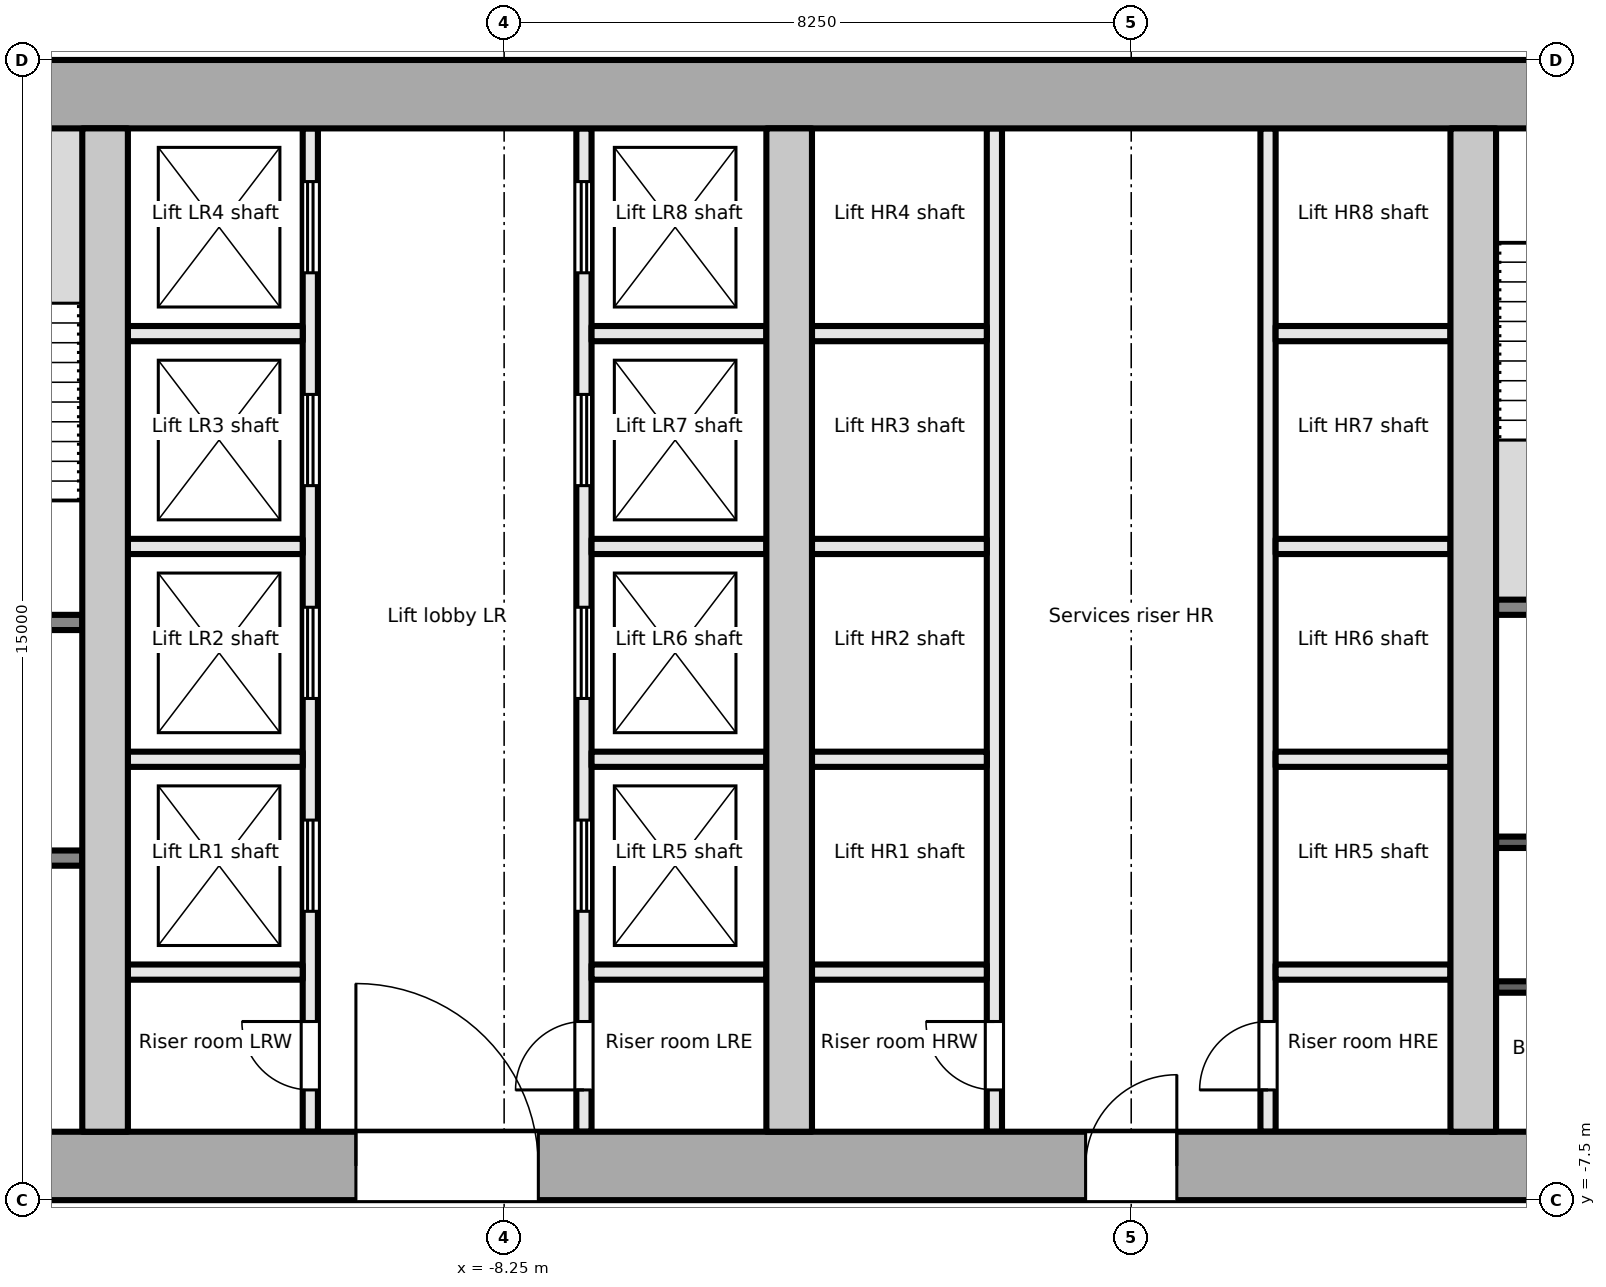
"""IFC4 building model, lengths in metres.
Left out: names, types, materials, properties, quantities, classifications, styles, units other than length and angle.
Written with IfcOpenShell. Run it as: python <this file> out.ifc"""

import sys

from ifc_helpers import new_model, si_unit, direction, frame, frame_2d, origin, place, context, subcontext, project, spatial, rectangle, extrude, element, fill, save


model = new_model("IFC4")
c1 = context("Model", 3, precision=1e-05, world=origin(), true_north=direction((0.0, 1.0)))
c2 = subcontext(c1, "Body", "Model", "MODEL_VIEW")
j1 = project(units=[si_unit("LENGTHUNIT", "METRE"), si_unit("PLANEANGLEUNIT", "RADIAN")], contexts=[c1])
p1 = place(None, origin())
s1 = spatial("IfcSite", under=j1, at=p1, CompositionType="ELEMENT")
p2 = place(p1, origin())
s2 = spatial("IfcBuilding", under=s1, at=p2, CompositionType="ELEMENT")
p3 = place(p2, frame((0.0, 0.0, 79.7)))
s3 = spatial("IfcBuildingStorey", under=s2, at=p3, CompositionType="ELEMENT", Elevation=79.7)
p4 = place(p3, frame((-18.0, -7.05, -0.2), z_axis=(0.0, 0.0, 1.0), x_axis=(1.0, 0.0, 0.0)))
e1 = element("IfcWall", 1, at=p4, inside=s3, PredefinedType="SHEAR", context=c2, shape_type="SweptSolid", body=[
    extrude(rectangle(XDim=36.0, YDim=0.9, at=frame_2d((18.0, 0.0))), origin(), (0.0, 0.0, 1.0), 4.0),
])
p5 = place(p4, frame((7.8, 0.0, 0.2)))
e2 = element("IfcOpeningElement", 2, at=p5, cuts=e1, PredefinedType="OPENING", context=c2, shape_type="SweptSolid", body=[
    extrude(rectangle(XDim=2.4, YDim=2.1, at=frame_2d((1.2, 1.05))), frame((0.0, 0.46, 0.0), z_axis=(0.0, -1.0, 0.0), x_axis=(1.0, 0.0, 0.0)), (0.0, 0.0, 1.0), 0.921),
])
p6 = place(p4, frame((17.4, 0.0, 0.2)))
e3 = element("IfcOpeningElement", 3, at=p6, cuts=e1, PredefinedType="OPENING", context=c2, shape_type="SweptSolid", body=[
    extrude(rectangle(XDim=1.2, YDim=2.1, at=frame_2d((0.6, 1.05))), frame((0.0, 0.46, 0.0), z_axis=(0.0, -1.0, 0.0), x_axis=(1.0, 0.0, 0.0)), (0.0, 0.0, 1.0), 0.921),
])
p7 = place(p4, frame((26.1, 0.0, 0.2)))
e4 = element("IfcOpeningElement", 4, at=p7, cuts=e1, PredefinedType="OPENING", context=c2, shape_type="SweptSolid", body=[
    extrude(rectangle(XDim=2.4, YDim=2.1, at=frame_2d((1.2, 1.05))), frame((0.0, 0.46, 0.0), z_axis=(0.0, -1.0, 0.0), x_axis=(1.0, 0.0, 0.0)), (0.0, 0.0, 1.0), 0.921),
])
p8 = place(p3, frame((-18.0, 7.05, -0.2), z_axis=(0.0, 0.0, 1.0), x_axis=(1.0, 0.0, 0.0)))
e5 = element("IfcWall", 5, at=p8, inside=s3, PredefinedType="SHEAR", context=c2, shape_type="SweptSolid", body=[
    extrude(rectangle(XDim=36.0, YDim=0.9, at=frame_2d((18.0, 0.0))), origin(), (0.0, 0.0, 1.0), 4.0),
])
for number, where, z_axis, x_axis in (
    (6, (-13.5, -6.6, -0.2), (0.0, 0.0, 1.0), (0.0, 1.0, 0.0)),
    (7, (-4.5, -6.6, -0.2), (0.0, 0.0, 1.0), (0.0, 1.0, 0.0)),
    (8, (4.5, -6.6, -0.2), (0.0, 0.0, 1.0), (0.0, 1.0, 0.0)),
):
    element("IfcWall", number, at=place(p3, frame(where, z_axis=z_axis, x_axis=x_axis)), inside=s3, PredefinedType="SHEAR", context=c2, shape_type="SweptSolid", body=[
        extrude(rectangle(XDim=13.2, YDim=0.6, at=frame_2d((6.6, 0.0))), origin(), (0.0, 0.0, 1.0), 4.0),
    ])
p9 = place(p3, frame((-17.1, -3.0, 0.0), z_axis=(0.0, 0.0, 1.0), x_axis=(1.0, 0.0, 0.0)))
e9 = element("IfcWall", 9, at=p9, inside=s3, PredefinedType="PARTITIONING", context=c2, shape_type="SweptSolid", body=[
    extrude(rectangle(XDim=3.3, YDim=0.2, at=frame_2d((1.65, 0.0))), origin(), (0.0, 0.0, 1.0), 3.8),
])
p10 = place(p9, frame((1.1, 0.0, 0.0)))
e10 = element("IfcOpeningElement", 10, at=p10, cuts=e9, PredefinedType="OPENING", context=c2, shape_type="SweptSolid", body=[
    extrude(rectangle(XDim=1.1, YDim=2.1, at=frame_2d((0.55, 1.05))), frame((0.0, 0.111, 0.0), z_axis=(0.0, -1.0, 0.0), x_axis=(1.0, 0.0, 0.0)), (0.0, 0.0, 1.0), 0.221),
])
p11 = place(p3, frame((-17.1, 0.1, 0.0), z_axis=(0.0, 0.0, 1.0), x_axis=(1.0, 0.0, 0.0)))
e11 = element("IfcWall", 11, at=p11, inside=s3, PredefinedType="PARTITIONING", context=c2, shape_type="SweptSolid", body=[
    extrude(rectangle(XDim=3.3, YDim=0.2, at=frame_2d((1.65, 0.0))), origin(), (0.0, 0.0, 1.0), 3.8),
])
p12 = place(p11, frame((1.1, 0.0, 0.0)))
e12 = element("IfcOpeningElement", 12, at=p12, cuts=e11, PredefinedType="OPENING", context=c2, shape_type="SweptSolid", body=[
    extrude(rectangle(XDim=1.1, YDim=2.1, at=frame_2d((0.55, 1.05))), frame((0.0, 0.111, 0.0), z_axis=(0.0, -1.0, 0.0), x_axis=(1.0, 0.0, 0.0)), (0.0, 0.0, 1.0), 0.221),
])
p13 = place(p3, frame((-10.8, -6.6, 0.0), z_axis=(0.0, 0.0, 1.0), x_axis=(0.0, 1.0, 0.0)))
e13 = element("IfcWall", 13, at=p13, inside=s3, PredefinedType="PARTITIONING", context=c2, shape_type="SweptSolid", body=[
    extrude(rectangle(XDim=13.2, YDim=0.2, at=frame_2d((6.6, 0.0))), origin(), (0.0, 0.0, 1.0), 3.8),
])
p14 = place(p13, frame((0.55, 0.0, 0.0)))
e14 = element("IfcOpeningElement", 14, at=p14, cuts=e13, PredefinedType="OPENING", context=c2, shape_type="SweptSolid", body=[
    extrude(rectangle(XDim=0.9, YDim=2.1, at=frame_2d((0.45, 1.05))), frame((0.0, 0.111, 0.0), z_axis=(0.0, -1.0, 0.0), x_axis=(1.0, 0.0, 0.0)), (0.0, 0.0, 1.0), 0.221),
])
p15 = place(p13, frame((2.9, 0.0, 0.0)))
e15 = element("IfcOpeningElement", 15, at=p15, cuts=e13, PredefinedType="OPENING", context=c2, shape_type="SweptSolid", body=[
    extrude(rectangle(XDim=1.2, YDim=2.1, at=frame_2d((0.6, 1.05))), frame((0.0, 0.111, 0.0), z_axis=(0.0, -1.0, 0.0), x_axis=(1.0, 0.0, 0.0)), (0.0, 0.0, 1.0), 0.221),
])
p16 = place(p13, frame((5.7, 0.0, 0.0)))
e16 = element("IfcOpeningElement", 16, at=p16, cuts=e13, PredefinedType="OPENING", context=c2, shape_type="SweptSolid", body=[
    extrude(rectangle(XDim=1.2, YDim=2.1, at=frame_2d((0.6, 1.05))), frame((0.0, 0.111, 0.0), z_axis=(0.0, -1.0, 0.0), x_axis=(1.0, 0.0, 0.0)), (0.0, 0.0, 1.0), 0.221),
])
p17 = place(p13, frame((8.5, 0.0, 0.0)))
e17 = element("IfcOpeningElement", 17, at=p17, cuts=e13, PredefinedType="OPENING", context=c2, shape_type="SweptSolid", body=[
    extrude(rectangle(XDim=1.2, YDim=2.1, at=frame_2d((0.6, 1.05))), frame((0.0, 0.111, 0.0), z_axis=(0.0, -1.0, 0.0), x_axis=(1.0, 0.0, 0.0)), (0.0, 0.0, 1.0), 0.221),
])
p18 = place(p13, frame((11.3, 0.0, 0.0)))
e18 = element("IfcOpeningElement", 18, at=p18, cuts=e13, PredefinedType="OPENING", context=c2, shape_type="SweptSolid", body=[
    extrude(rectangle(XDim=1.2, YDim=2.1, at=frame_2d((0.6, 1.05))), frame((0.0, 0.111, 0.0), z_axis=(0.0, -1.0, 0.0), x_axis=(1.0, 0.0, 0.0)), (0.0, 0.0, 1.0), 0.221),
])
p19 = place(p3, frame((-7.2, -6.6, 0.0), z_axis=(0.0, 0.0, 1.0), x_axis=(0.0, 1.0, 0.0)))
e19 = element("IfcWall", 19, at=p19, inside=s3, PredefinedType="PARTITIONING", context=c2, shape_type="SweptSolid", body=[
    extrude(rectangle(XDim=13.2, YDim=0.2, at=frame_2d((6.6, 0.0))), origin(), (0.0, 0.0, 1.0), 3.8),
])
p20 = place(p19, frame((0.55, 0.0, 0.0)))
e20 = element("IfcOpeningElement", 20, at=p20, cuts=e19, PredefinedType="OPENING", context=c2, shape_type="SweptSolid", body=[
    extrude(rectangle(XDim=0.9, YDim=2.1, at=frame_2d((0.45, 1.05))), frame((0.0, 0.111, 0.0), z_axis=(0.0, -1.0, 0.0), x_axis=(1.0, 0.0, 0.0)), (0.0, 0.0, 1.0), 0.221),
])
p21 = place(p19, frame((2.9, 0.0, 0.0)))
e21 = element("IfcOpeningElement", 21, at=p21, cuts=e19, PredefinedType="OPENING", context=c2, shape_type="SweptSolid", body=[
    extrude(rectangle(XDim=1.2, YDim=2.1, at=frame_2d((0.6, 1.05))), frame((0.0, 0.111, 0.0), z_axis=(0.0, -1.0, 0.0), x_axis=(1.0, 0.0, 0.0)), (0.0, 0.0, 1.0), 0.221),
])
p22 = place(p19, frame((5.7, 0.0, 0.0)))
e22 = element("IfcOpeningElement", 22, at=p22, cuts=e19, PredefinedType="OPENING", context=c2, shape_type="SweptSolid", body=[
    extrude(rectangle(XDim=1.2, YDim=2.1, at=frame_2d((0.6, 1.05))), frame((0.0, 0.111, 0.0), z_axis=(0.0, -1.0, 0.0), x_axis=(1.0, 0.0, 0.0)), (0.0, 0.0, 1.0), 0.221),
])
p23 = place(p19, frame((8.5, 0.0, 0.0)))
e23 = element("IfcOpeningElement", 23, at=p23, cuts=e19, PredefinedType="OPENING", context=c2, shape_type="SweptSolid", body=[
    extrude(rectangle(XDim=1.2, YDim=2.1, at=frame_2d((0.6, 1.05))), frame((0.0, 0.111, 0.0), z_axis=(0.0, -1.0, 0.0), x_axis=(1.0, 0.0, 0.0)), (0.0, 0.0, 1.0), 0.221),
])
p24 = place(p19, frame((11.3, 0.0, 0.0)))
e24 = element("IfcOpeningElement", 24, at=p24, cuts=e19, PredefinedType="OPENING", context=c2, shape_type="SweptSolid", body=[
    extrude(rectangle(XDim=1.2, YDim=2.1, at=frame_2d((0.6, 1.05))), frame((0.0, 0.111, 0.0), z_axis=(0.0, -1.0, 0.0), x_axis=(1.0, 0.0, 0.0)), (0.0, 0.0, 1.0), 0.221),
])
for number, where, z_axis, x_axis in (
    (25, (-13.2, -1.7, 0.0), (0.0, 0.0, 1.0), (1.0, 0.0, 0.0)),
    (26, (-13.2, 1.1, 0.0), (0.0, 0.0, 1.0), (1.0, 0.0, 0.0)),
    (27, (-13.2, 3.9, 0.0), (0.0, 0.0, 1.0), (1.0, 0.0, 0.0)),
    (28, (-13.2, -4.5, 0.0), (0.0, 0.0, 1.0), (1.0, 0.0, 0.0)),
    (29, (-7.1, -1.7, 0.0), (0.0, 0.0, 1.0), (1.0, 0.0, 0.0)),
    (30, (-7.1, 1.1, 0.0), (0.0, 0.0, 1.0), (1.0, 0.0, 0.0)),
    (31, (-7.1, 3.9, 0.0), (0.0, 0.0, 1.0), (1.0, 0.0, 0.0)),
    (32, (-7.1, -4.5, 0.0), (0.0, 0.0, 1.0), (1.0, 0.0, 0.0)),
):
    element("IfcWall", number, at=place(p3, frame(where, z_axis=z_axis, x_axis=x_axis)), inside=s3, PredefinedType="PARTITIONING", context=c2, shape_type="SweptSolid", body=[
        extrude(rectangle(XDim=2.3, YDim=0.2, at=frame_2d((1.15, 0.0))), origin(), (0.0, 0.0, 1.0), 3.8),
    ])
p25 = place(p3, frame((-1.8, -6.6, 0.0), z_axis=(0.0, 0.0, 1.0), x_axis=(0.0, 1.0, 0.0)))
e33 = element("IfcWall", 33, at=p25, inside=s3, PredefinedType="PARTITIONING", context=c2, shape_type="SweptSolid", body=[
    extrude(rectangle(XDim=13.2, YDim=0.2, at=frame_2d((6.6, 0.0))), origin(), (0.0, 0.0, 1.0), 3.8),
])
p26 = place(p25, frame((0.55, 0.0, 0.0)))
e34 = element("IfcOpeningElement", 34, at=p26, cuts=e33, PredefinedType="OPENING", context=c2, shape_type="SweptSolid", body=[
    extrude(rectangle(XDim=0.9, YDim=2.1, at=frame_2d((0.45, 1.05))), frame((0.0, 0.111, 0.0), z_axis=(0.0, -1.0, 0.0), x_axis=(1.0, 0.0, 0.0)), (0.0, 0.0, 1.0), 0.221),
])
p27 = place(p3, frame((1.8, -6.6, 0.0), z_axis=(0.0, 0.0, 1.0), x_axis=(0.0, 1.0, 0.0)))
e35 = element("IfcWall", 35, at=p27, inside=s3, PredefinedType="PARTITIONING", context=c2, shape_type="SweptSolid", body=[
    extrude(rectangle(XDim=13.2, YDim=0.2, at=frame_2d((6.6, 0.0))), origin(), (0.0, 0.0, 1.0), 3.8),
])
p28 = place(p27, frame((0.55, 0.0, 0.0)))
e36 = element("IfcOpeningElement", 36, at=p28, cuts=e35, PredefinedType="OPENING", context=c2, shape_type="SweptSolid", body=[
    extrude(rectangle(XDim=0.9, YDim=2.1, at=frame_2d((0.45, 1.05))), frame((0.0, 0.111, 0.0), z_axis=(0.0, -1.0, 0.0), x_axis=(1.0, 0.0, 0.0)), (0.0, 0.0, 1.0), 0.221),
])
for number, where, z_axis, x_axis in (
    (37, (-4.2, -1.7, 0.0), (0.0, 0.0, 1.0), (1.0, 0.0, 0.0)),
    (38, (-4.2, 1.1, 0.0), (0.0, 0.0, 1.0), (1.0, 0.0, 0.0)),
    (39, (-4.2, 3.9, 0.0), (0.0, 0.0, 1.0), (1.0, 0.0, 0.0)),
    (40, (-4.2, -4.5, 0.0), (0.0, 0.0, 1.0), (1.0, 0.0, 0.0)),
    (41, (1.9, -1.7, 0.0), (0.0, 0.0, 1.0), (1.0, 0.0, 0.0)),
    (42, (1.9, 1.1, 0.0), (0.0, 0.0, 1.0), (1.0, 0.0, 0.0)),
    (43, (1.9, 3.9, 0.0), (0.0, 0.0, 1.0), (1.0, 0.0, 0.0)),
    (44, (1.9, -4.5, 0.0), (0.0, 0.0, 1.0), (1.0, 0.0, 0.0)),
):
    element("IfcWall", number, at=place(p3, frame(where, z_axis=z_axis, x_axis=x_axis)), inside=s3, PredefinedType="PARTITIONING", context=c2, shape_type="SweptSolid", body=[
        extrude(rectangle(XDim=2.3, YDim=0.2, at=frame_2d((1.15, 0.0))), origin(), (0.0, 0.0, 1.0), 3.8),
    ])
p29 = place(p3, frame((4.8, 0.3, 0.0), z_axis=(0.0, 0.0, 1.0), x_axis=(1.0, 0.0, 0.0)))
e45 = element("IfcWall", 45, at=p29, inside=s3, PredefinedType="PARTITIONING", context=c2, shape_type="SweptSolid", body=[
    extrude(rectangle(XDim=3.15, YDim=0.2, at=frame_2d((1.575, 0.0))), origin(), (0.0, 0.0, 1.0), 3.8),
])
for number, where, z_axis, x_axis in (
    (46, (4.8, -4.696, 0.0), (0.0, 0.0, 1.0), (1.0, 0.0, 0.0)),
    (47, (4.8, -2.792, 0.0), (0.0, 0.0, 1.0), (1.0, 0.0, 0.0)),
):
    element("IfcWall", number, at=place(p3, frame(where, z_axis=z_axis, x_axis=x_axis)), inside=s3, PredefinedType="PARTITIONING", context=c2, shape_type="SweptSolid", body=[
        extrude(rectangle(XDim=3.15, YDim=0.15, at=frame_2d((1.575, 0.0))), origin(), (0.0, 0.0, 1.0), 3.8),
    ])
p30 = place(p14, origin())
e48 = element("IfcDoor", 48, at=p30, inside=s3, OperationType="SINGLE_SWING_RIGHT", PredefinedType="DOOR", context=c2, shape_type="SweptSolid", body=[
    extrude(rectangle(XDim=0.9, YDim=2.1, at=frame_2d((0.45, 1.05))), frame((0.0, 0.025, 0.0), z_axis=(0.0, -1.0, 0.0), x_axis=(1.0, 0.0, 0.0)), (0.0, 0.0, 1.0), 0.05),
])
fill(e14, e48)
p31 = place(p15, origin())
e49 = element("IfcDoor", 49, at=p31, inside=s3, OperationType="DOUBLE_DOOR_SLIDING", PredefinedType="DOOR", context=c2, shape_type="SweptSolid", body=[
    extrude(rectangle(XDim=1.2, YDim=2.1, at=frame_2d((0.6, 1.05))), frame((0.0, 0.025, 0.0), z_axis=(0.0, -1.0, 0.0), x_axis=(1.0, 0.0, 0.0)), (0.0, 0.0, 1.0), 0.05),
])
fill(e15, e49)
p32 = place(p16, origin())
e50 = element("IfcDoor", 50, at=p32, inside=s3, OperationType="DOUBLE_DOOR_SLIDING", PredefinedType="DOOR", context=c2, shape_type="SweptSolid", body=[
    extrude(rectangle(XDim=1.2, YDim=2.1, at=frame_2d((0.6, 1.05))), frame((0.0, 0.025, 0.0), z_axis=(0.0, -1.0, 0.0), x_axis=(1.0, 0.0, 0.0)), (0.0, 0.0, 1.0), 0.05),
])
fill(e16, e50)
p33 = place(p17, origin())
e51 = element("IfcDoor", 51, at=p33, inside=s3, OperationType="DOUBLE_DOOR_SLIDING", PredefinedType="DOOR", context=c2, shape_type="SweptSolid", body=[
    extrude(rectangle(XDim=1.2, YDim=2.1, at=frame_2d((0.6, 1.05))), frame((0.0, 0.025, 0.0), z_axis=(0.0, -1.0, 0.0), x_axis=(1.0, 0.0, 0.0)), (0.0, 0.0, 1.0), 0.05),
])
fill(e17, e51)
p34 = place(p18, origin())
e52 = element("IfcDoor", 52, at=p34, inside=s3, OperationType="DOUBLE_DOOR_SLIDING", PredefinedType="DOOR", context=c2, shape_type="SweptSolid", body=[
    extrude(rectangle(XDim=1.2, YDim=2.1, at=frame_2d((0.6, 1.05))), frame((0.0, 0.025, 0.0), z_axis=(0.0, -1.0, 0.0), x_axis=(1.0, 0.0, 0.0)), (0.0, 0.0, 1.0), 0.05),
])
fill(e18, e52)
p35 = place(p20, origin())
e53 = element("IfcDoor", 53, at=p35, inside=s3, OperationType="SINGLE_SWING_LEFT", PredefinedType="DOOR", context=c2, shape_type="SweptSolid", body=[
    extrude(rectangle(XDim=0.9, YDim=2.1, at=frame_2d((0.45, 1.05))), frame((0.0, 0.025, 0.0), z_axis=(0.0, -1.0, 0.0), x_axis=(1.0, 0.0, 0.0)), (0.0, 0.0, 1.0), 0.05),
])
fill(e20, e53)
p36 = place(p21, origin())
e54 = element("IfcDoor", 54, at=p36, inside=s3, OperationType="DOUBLE_DOOR_SLIDING", PredefinedType="DOOR", context=c2, shape_type="SweptSolid", body=[
    extrude(rectangle(XDim=1.2, YDim=2.1, at=frame_2d((0.6, 1.05))), frame((0.0, 0.025, 0.0), z_axis=(0.0, -1.0, 0.0), x_axis=(1.0, 0.0, 0.0)), (0.0, 0.0, 1.0), 0.05),
])
fill(e21, e54)
p37 = place(p22, origin())
e55 = element("IfcDoor", 55, at=p37, inside=s3, OperationType="DOUBLE_DOOR_SLIDING", PredefinedType="DOOR", context=c2, shape_type="SweptSolid", body=[
    extrude(rectangle(XDim=1.2, YDim=2.1, at=frame_2d((0.6, 1.05))), frame((0.0, 0.025, 0.0), z_axis=(0.0, -1.0, 0.0), x_axis=(1.0, 0.0, 0.0)), (0.0, 0.0, 1.0), 0.05),
])
fill(e22, e55)
p38 = place(p23, origin())
e56 = element("IfcDoor", 56, at=p38, inside=s3, OperationType="DOUBLE_DOOR_SLIDING", PredefinedType="DOOR", context=c2, shape_type="SweptSolid", body=[
    extrude(rectangle(XDim=1.2, YDim=2.1, at=frame_2d((0.6, 1.05))), frame((0.0, 0.025, 0.0), z_axis=(0.0, -1.0, 0.0), x_axis=(1.0, 0.0, 0.0)), (0.0, 0.0, 1.0), 0.05),
])
fill(e23, e56)
p39 = place(p24, origin())
e57 = element("IfcDoor", 57, at=p39, inside=s3, OperationType="DOUBLE_DOOR_SLIDING", PredefinedType="DOOR", context=c2, shape_type="SweptSolid", body=[
    extrude(rectangle(XDim=1.2, YDim=2.1, at=frame_2d((0.6, 1.05))), frame((0.0, 0.025, 0.0), z_axis=(0.0, -1.0, 0.0), x_axis=(1.0, 0.0, 0.0)), (0.0, 0.0, 1.0), 0.05),
])
fill(e24, e57)
p40 = place(p5, origin())
e58 = element("IfcDoor", 58, at=p40, inside=s3, OperationType="DOUBLE_DOOR_DOUBLE_SWING", PredefinedType="DOOR", context=c2, shape_type="SweptSolid", body=[
    extrude(rectangle(XDim=2.4, YDim=2.1, at=frame_2d((1.2, 1.05))), frame((0.0, 0.025, 0.0), z_axis=(0.0, -1.0, 0.0), x_axis=(1.0, 0.0, 0.0)), (0.0, 0.0, 1.0), 0.05),
])
fill(e2, e58)
p41 = place(p26, origin())
e59 = element("IfcDoor", 59, at=p41, inside=s3, OperationType="SINGLE_SWING_RIGHT", PredefinedType="DOOR", context=c2, shape_type="SweptSolid", body=[
    extrude(rectangle(XDim=0.9, YDim=2.1, at=frame_2d((0.45, 1.05))), frame((0.0, 0.025, 0.0), z_axis=(0.0, -1.0, 0.0), x_axis=(1.0, 0.0, 0.0)), (0.0, 0.0, 1.0), 0.05),
])
fill(e34, e59)
p42 = place(p28, origin())
e60 = element("IfcDoor", 60, at=p42, inside=s3, OperationType="SINGLE_SWING_LEFT", PredefinedType="DOOR", context=c2, shape_type="SweptSolid", body=[
    extrude(rectangle(XDim=0.9, YDim=2.1, at=frame_2d((0.45, 1.05))), frame((0.0, 0.025, 0.0), z_axis=(0.0, -1.0, 0.0), x_axis=(1.0, 0.0, 0.0)), (0.0, 0.0, 1.0), 0.05),
])
fill(e36, e60)
p43 = place(p6, origin())
e61 = element("IfcDoor", 61, at=p43, inside=s3, OperationType="SINGLE_SWING_RIGHT", PredefinedType="DOOR", context=c2, shape_type="SweptSolid", body=[
    extrude(rectangle(XDim=1.2, YDim=2.1, at=frame_2d((0.6, 1.05))), frame((0.0, 0.025, 0.0), z_axis=(0.0, -1.0, 0.0), x_axis=(1.0, 0.0, 0.0)), (0.0, 0.0, 1.0), 0.05),
])
fill(e3, e61)
save(model, sys.argv[1])
